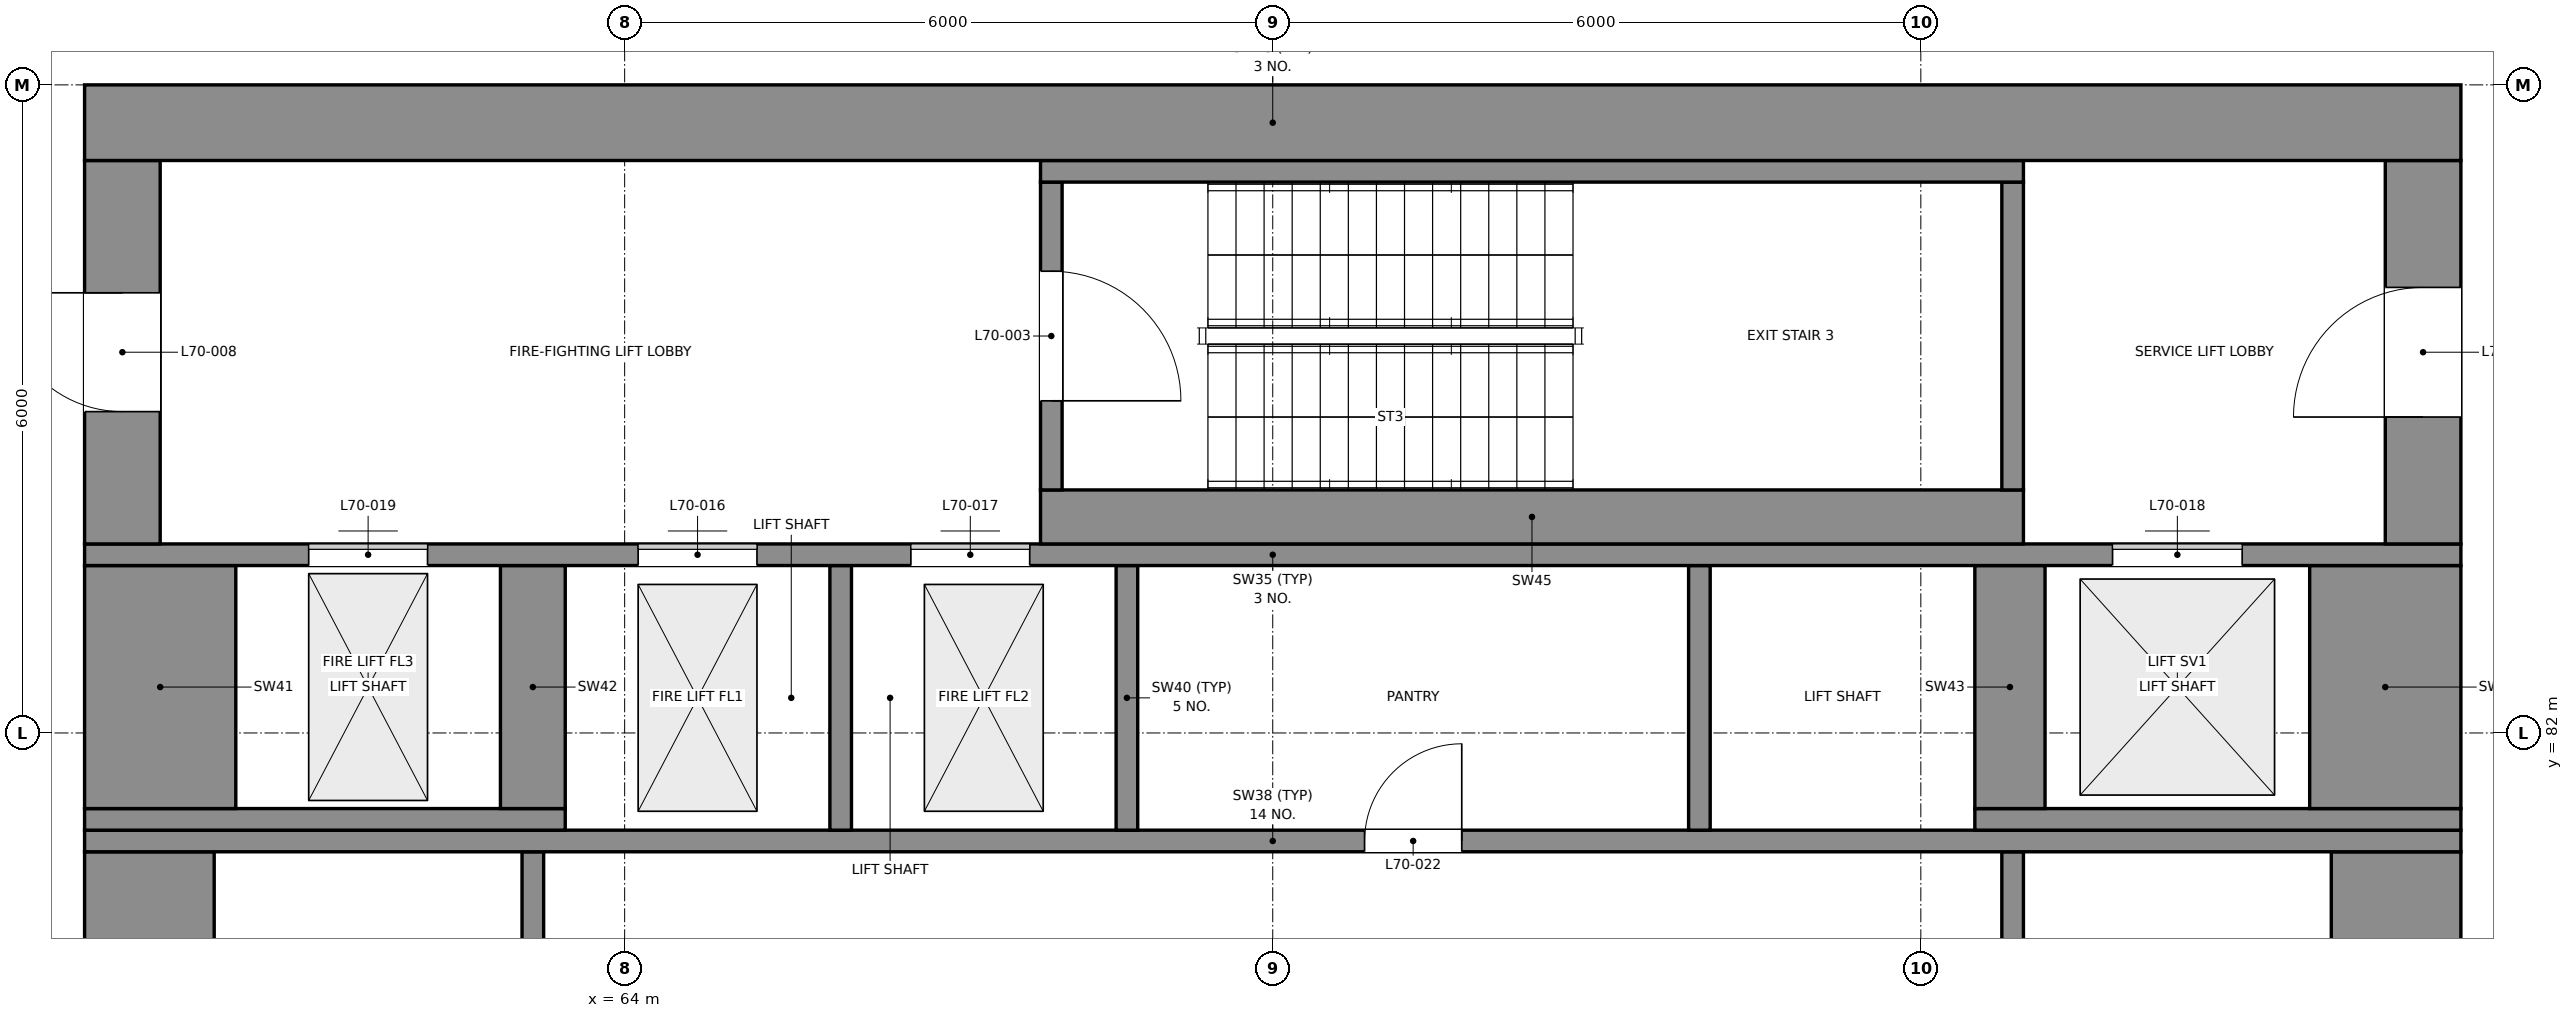
"""IFC4 building model, lengths in metres.
Left out: names, types, materials, properties, quantities, classifications, styles, units other than length and angle.
Written with IfcOpenShell. Run it as: python <this file> out.ifc"""

import sys

from ifc_helpers import new_model, si_unit, direction, frame, frame_2d, origin, place, context, subcontext, project, spatial, rectangle, extrude, element, fill, save


model = new_model("IFC4")
c1 = context("Model", 3, precision=1e-05, world=origin(), true_north=direction((0.0, 1.0)))
c2 = subcontext(c1, "Body", "Model", "MODEL_VIEW")
j1 = project(units=[si_unit("LENGTHUNIT", "METRE"), si_unit("PLANEANGLEUNIT", "RADIAN")], contexts=[c1])
p1 = place(None, origin())
s1 = spatial("IfcSite", under=j1, at=p1, CompositionType="ELEMENT")
p2 = place(p1, origin())
s2 = spatial("IfcBuilding", under=s1, at=p2, CompositionType="ELEMENT")
p3 = place(p2, frame((0.0, 0.0, 295.1)))
s3 = spatial("IfcBuildingStorey", under=s2, at=p3, CompositionType="ELEMENT", Elevation=295.1)
p4 = place(p3, frame((86.872, 83.854, 0.0), z_axis=(0.0, 0.0, 1.0), x_axis=(-0.809017735842, 0.587784231749, 0.0)))
e1 = element("IfcWall", 1, at=p4, inside=s3, PredefinedType="SOLIDWALL", context=c2, shape_type="SweptSolid", body=[
    extrude(rectangle(XDim=6.782, YDim=0.32, at=frame_2d((3.391, 0.0))), origin(), (0.0, 0.0, 1.0), 4.6),
])
for number, where, z_axis, x_axis in (
    (2, (81.385, 87.84, 0.0), (0.0, 0.0, 1.0), (-1.0, 0.0, 0.0)),
    (3, (59.0, 87.84, 0.0), (0.0, 0.0, 1.0), (-1.0, 0.0, 0.0)),
):
    element("IfcWall", number, at=place(p3, frame(where, z_axis=z_axis, x_axis=x_axis)), inside=s3, PredefinedType="SOLIDWALL", context=c2, shape_type="SweptSolid", body=[
        extrude(rectangle(XDim=0.385, YDim=0.32, at=frame_2d((0.192, 0.0))), origin(), (0.0, 0.0, 1.0), 4.6),
    ])
p5 = place(p3, frame((58.615, 87.84, 0.0), z_axis=(0.0, 0.0, 1.0), x_axis=(-0.809017735842, -0.587784231749, 0.0)))
e4 = element("IfcWall", 4, at=p5, inside=s3, PredefinedType="SOLIDWALL", context=c2, shape_type="SweptSolid", body=[
    extrude(rectangle(XDim=6.782, YDim=0.32, at=frame_2d((3.391, 0.0))), origin(), (0.0, 0.0, 1.0), 4.6),
])
for number, where, z_axis, x_axis in (
    (5, (59.6, 71.7, 0.0), (0.0, 0.0, 1.0), (0.0, 1.0, 0.0)),
    (6, (80.4, 71.7, 0.0), (0.0, 0.0, 1.0), (0.0, 1.0, 0.0)),
):
    element("IfcWall", number, at=place(p3, frame(where, z_axis=z_axis, x_axis=x_axis)), inside=s3, PredefinedType="SHEAR", context=c2, shape_type="SweptSolid", body=[
        extrude(rectangle(XDim=9.2, YDim=1.2, at=frame_2d((4.6, 0.0))), origin(), (0.0, 0.0, 1.0), 5.0),
    ])
for number, where, z_axis, x_axis in (
    (7, (63.15, 77.7, 0.0), (0.0, 0.0, 1.0), (0.0, 1.0, 0.0)),
    (8, (76.85, 77.7, 0.0), (0.0, 0.0, 1.0), (0.0, 1.0, 0.0)),
):
    element("IfcWall", number, at=place(p3, frame(where, z_axis=z_axis, x_axis=x_axis)), inside=s3, PredefinedType="SHEAR", context=c2, shape_type="SweptSolid", body=[
        extrude(rectangle(XDim=3.2, YDim=0.2, at=frame_2d((1.6, 0.0))), origin(), (0.0, 0.0, 1.0), 5.0),
    ])
p6 = place(p3, frame((59.0, 81.0, 0.0), z_axis=(0.0, 0.0, 1.0), x_axis=(1.0, 0.0, 0.0)))
e9 = element("IfcWall", 9, at=p6, inside=s3, PredefinedType="SHEAR", context=c2, shape_type="SweptSolid", body=[
    extrude(rectangle(XDim=22.0, YDim=0.2, at=frame_2d((11.0, 0.0))), origin(), (0.0, 0.0, 1.0), 5.0),
])
p7 = place(p6, frame((11.85, 0.0, 0.0)))
e10 = element("IfcOpeningElement", 10, at=p7, cuts=e9, PredefinedType="OPENING", context=c2, shape_type="SweptSolid", body=[
    extrude(rectangle(XDim=0.9, YDim=2.1, at=frame_2d((0.45, 1.05))), frame((0.0, 0.11, 0.0), z_axis=(0.0, -1.0, 0.0), x_axis=(1.0, 0.0, 0.0)), (0.0, 0.0, 1.0), 0.22),
])
p8 = place(p3, frame((59.0, 81.2, 0.0), z_axis=(0.0, 0.0, 1.0), x_axis=(1.0, 0.0, 0.0)))
e11 = element("IfcWall", 11, at=p8, inside=s3, PredefinedType="SHEAR", context=c2, shape_type="SweptSolid", body=[
    extrude(rectangle(XDim=4.45, YDim=0.2, at=frame_2d((2.225, 0.0))), origin(), (0.0, 0.0, 1.0), 5.0),
])
for number, where, z_axis, x_axis in (
    (12, (66.0, 81.1, 0.0), (0.0, 0.0, 1.0), (0.0, 1.0, 0.0)),
    (13, (68.65, 81.1, 0.0), (0.0, 0.0, 1.0), (0.0, 1.0, 0.0)),
    (14, (73.95, 81.1, 0.0), (0.0, 0.0, 1.0), (0.0, 1.0, 0.0)),
):
    element("IfcWall", number, at=place(p3, frame(where, z_axis=z_axis, x_axis=x_axis)), inside=s3, PredefinedType="SHEAR", context=c2, shape_type="SweptSolid", body=[
        extrude(rectangle(XDim=2.45, YDim=0.2, at=frame_2d((1.225, 0.0))), origin(), (0.0, 0.0, 1.0), 5.0),
    ])
p9 = place(p3, frame((76.5, 81.2, 0.0), z_axis=(0.0, 0.0, 1.0), x_axis=(1.0, 0.0, 0.0)))
e15 = element("IfcWall", 15, at=p9, inside=s3, PredefinedType="SHEAR", context=c2, shape_type="SweptSolid", body=[
    extrude(rectangle(XDim=4.5, YDim=0.2, at=frame_2d((2.25, 0.0))), origin(), (0.0, 0.0, 1.0), 5.0),
])
p10 = place(p3, frame((59.7, 81.3, 0.0), z_axis=(0.0, 0.0, 1.0), x_axis=(0.0, 1.0, 0.0)))
e16 = element("IfcWall", 16, at=p10, inside=s3, PredefinedType="SHEAR", context=c2, shape_type="SweptSolid", body=[
    extrude(rectangle(XDim=2.25, YDim=1.4, at=frame_2d((1.125, 0.0))), origin(), (0.0, 0.0, 1.0), 5.0),
])
p11 = place(p3, frame((63.15, 81.3, 0.0), z_axis=(0.0, 0.0, 1.0), x_axis=(0.0, 1.0, 0.0)))
e17 = element("IfcWall", 17, at=p11, inside=s3, PredefinedType="SHEAR", context=c2, shape_type="SweptSolid", body=[
    extrude(rectangle(XDim=2.25, YDim=0.6, at=frame_2d((1.125, 0.0))), origin(), (0.0, 0.0, 1.0), 5.0),
])
p12 = place(p3, frame((76.825, 81.3, 0.0), z_axis=(0.0, 0.0, 1.0), x_axis=(0.0, 1.0, 0.0)))
e18 = element("IfcWall", 18, at=p12, inside=s3, PredefinedType="SHEAR", context=c2, shape_type="SweptSolid", body=[
    extrude(rectangle(XDim=2.25, YDim=0.65, at=frame_2d((1.125, 0.0))), origin(), (0.0, 0.0, 1.0), 5.0),
])
p13 = place(p3, frame((80.3, 81.3, 0.0), z_axis=(0.0, 0.0, 1.0), x_axis=(0.0, 1.0, 0.0)))
e19 = element("IfcWall", 19, at=p13, inside=s3, PredefinedType="SHEAR", context=c2, shape_type="SweptSolid", body=[
    extrude(rectangle(XDim=2.25, YDim=1.4, at=frame_2d((1.125, 0.0))), origin(), (0.0, 0.0, 1.0), 5.0),
])
p14 = place(p3, frame((59.0, 83.65, 0.0), z_axis=(0.0, 0.0, 1.0), x_axis=(1.0, 0.0, 0.0)))
e20 = element("IfcWall", 20, at=p14, inside=s3, PredefinedType="SHEAR", context=c2, shape_type="SweptSolid", body=[
    extrude(rectangle(XDim=22.0, YDim=0.2, at=frame_2d((11.0, 0.0))), origin(), (0.0, 0.0, 1.0), 5.0),
])
p15 = place(p14, frame((5.125, 0.0, 0.0)))
e21 = element("IfcOpeningElement", 21, at=p15, cuts=e20, PredefinedType="OPENING", context=c2, shape_type="SweptSolid", body=[
    extrude(rectangle(XDim=1.1, YDim=2.1, at=frame_2d((0.55, 1.05))), frame((0.0, 0.11, 0.0), z_axis=(0.0, -1.0, 0.0), x_axis=(1.0, 0.0, 0.0)), (0.0, 0.0, 1.0), 0.22),
])
p16 = place(p14, frame((7.65, 0.0, 0.0)))
e22 = element("IfcOpeningElement", 22, at=p16, cuts=e20, PredefinedType="OPENING", context=c2, shape_type="SweptSolid", body=[
    extrude(rectangle(XDim=1.1, YDim=2.1, at=frame_2d((0.55, 1.05))), frame((0.0, 0.11, 0.0), z_axis=(0.0, -1.0, 0.0), x_axis=(1.0, 0.0, 0.0)), (0.0, 0.0, 1.0), 0.22),
])
p17 = place(p14, frame((18.775, 0.0, 0.0)))
e23 = element("IfcOpeningElement", 23, at=p17, cuts=e20, PredefinedType="OPENING", context=c2, shape_type="SweptSolid", body=[
    extrude(rectangle(XDim=1.2, YDim=2.1, at=frame_2d((0.6, 1.05))), frame((0.0, 0.11, 0.0), z_axis=(0.0, -1.0, 0.0), x_axis=(1.0, 0.0, 0.0)), (0.0, 0.0, 1.0), 0.22),
])
p18 = place(p14, frame((2.075, 0.0, 0.0)))
e24 = element("IfcOpeningElement", 24, at=p18, cuts=e20, PredefinedType="OPENING", context=c2, shape_type="SweptSolid", body=[
    extrude(rectangle(XDim=1.1, YDim=2.1, at=frame_2d((0.55, 1.05))), frame((0.0, 0.11, 0.0), z_axis=(0.0, -1.0, 0.0), x_axis=(1.0, 0.0, 0.0)), (0.0, 0.0, 1.0), 0.22),
])
p19 = place(p3, frame((59.35, 83.75, 0.0), z_axis=(0.0, 0.0, 1.0), x_axis=(0.0, 1.0, 0.0)))
e25 = element("IfcWall", 25, at=p19, inside=s3, PredefinedType="SHEAR", context=c2, shape_type="SweptSolid", body=[
    extrude(rectangle(XDim=3.55, YDim=0.7, at=frame_2d((1.775, 0.0))), origin(), (0.0, 0.0, 1.0), 5.0),
])
p20 = place(p19, frame((1.225, 0.0, 0.0)))
e26 = element("IfcOpeningElement", 26, at=p20, cuts=e25, PredefinedType="OPENING", context=c2, shape_type="SweptSolid", body=[
    extrude(rectangle(XDim=1.1, YDim=2.1, at=frame_2d((0.55, 1.05))), frame((0.0, 0.36, 0.0), z_axis=(0.0, -1.0, 0.0), x_axis=(1.0, 0.0, 0.0)), (0.0, 0.0, 1.0), 0.72),
])
p21 = place(p3, frame((67.85, 84.0, 0.0), z_axis=(0.0, 0.0, 1.0), x_axis=(1.0, 0.0, 0.0)))
e27 = element("IfcWall", 27, at=p21, inside=s3, PredefinedType="SHEAR", context=c2, shape_type="SweptSolid", body=[
    extrude(rectangle(XDim=9.1, YDim=0.5, at=frame_2d((4.55, 0.0))), origin(), (0.0, 0.0, 1.0), 5.0),
])
p22 = place(p3, frame((80.65, 83.75, 0.0), z_axis=(0.0, 0.0, 1.0), x_axis=(0.0, 1.0, 0.0)))
e28 = element("IfcWall", 28, at=p22, inside=s3, PredefinedType="SHEAR", context=c2, shape_type="SweptSolid", body=[
    extrude(rectangle(XDim=3.55, YDim=0.7, at=frame_2d((1.775, 0.0))), origin(), (0.0, 0.0, 1.0), 5.0),
])
p23 = place(p22, frame((1.175, 0.0, 0.0)))
e29 = element("IfcOpeningElement", 29, at=p23, cuts=e28, PredefinedType="OPENING", context=c2, shape_type="SweptSolid", body=[
    extrude(rectangle(XDim=1.2, YDim=2.1, at=frame_2d((0.6, 1.05))), frame((0.0, 0.36, 0.0), z_axis=(0.0, -1.0, 0.0), x_axis=(1.0, 0.0, 0.0)), (0.0, 0.0, 1.0), 0.72),
])
p24 = place(p3, frame((67.95, 84.25, 0.0), z_axis=(0.0, 0.0, 1.0), x_axis=(0.0, 1.0, 0.0)))
e30 = element("IfcWall", 30, at=p24, inside=s3, PredefinedType="SHEAR", context=c2, shape_type="SweptSolid", body=[
    extrude(rectangle(XDim=2.85, YDim=0.2, at=frame_2d((1.425, 0.0))), origin(), (0.0, 0.0, 1.0), 5.0),
])
p25 = place(p24, frame((0.825, 0.0, 0.0)))
e31 = element("IfcOpeningElement", 31, at=p25, cuts=e30, PredefinedType="OPENING", context=c2, shape_type="SweptSolid", body=[
    extrude(rectangle(XDim=1.2, YDim=2.1, at=frame_2d((0.6, 1.05))), frame((0.0, 0.11, 0.0), z_axis=(0.0, -1.0, 0.0), x_axis=(1.0, 0.0, 0.0)), (0.0, 0.0, 1.0), 0.22),
])
p26 = place(p3, frame((76.85, 84.25, 0.0), z_axis=(0.0, 0.0, 1.0), x_axis=(0.0, 1.0, 0.0)))
e32 = element("IfcWall", 32, at=p26, inside=s3, PredefinedType="SHEAR", context=c2, shape_type="SweptSolid", body=[
    extrude(rectangle(XDim=2.85, YDim=0.2, at=frame_2d((1.425, 0.0))), origin(), (0.0, 0.0, 1.0), 5.0),
])
p27 = place(p3, frame((67.85, 87.2, 0.0), z_axis=(0.0, 0.0, 1.0), x_axis=(1.0, 0.0, 0.0)))
e33 = element("IfcWall", 33, at=p27, inside=s3, PredefinedType="SHEAR", context=c2, shape_type="SweptSolid", body=[
    extrude(rectangle(XDim=9.1, YDim=0.2, at=frame_2d((4.55, 0.0))), origin(), (0.0, 0.0, 1.0), 5.0),
])
p28 = place(p3, frame((59.0, 87.65, 0.0), z_axis=(0.0, 0.0, 1.0), x_axis=(1.0, 0.0, 0.0)))
e34 = element("IfcWall", 34, at=p28, inside=s3, PredefinedType="SHEAR", context=c2, shape_type="SweptSolid", body=[
    extrude(rectangle(XDim=22.0, YDim=0.7, at=frame_2d((11.0, 0.0))), origin(), (0.0, 0.0, 1.0), 5.0),
])
p29 = place(p25, frame((1.2, 0.0, 0.0), z_axis=(0.0, 0.0, 1.0), x_axis=(-1.0, 0.0, 0.0)))
e35 = element("IfcDoor", 35, at=p29, inside=s3, OperationType="SINGLE_SWING_RIGHT", PredefinedType="DOOR", context=c2, shape_type="SweptSolid", body=[
    extrude(rectangle(XDim=1.2, YDim=2.1, at=frame_2d((0.6, 1.05))), frame((0.0, 0.025, 0.0), z_axis=(0.0, -1.0, 0.0), x_axis=(1.0, 0.0, 0.0)), (0.0, 0.0, 1.0), 0.05),
])
fill(e31, e35)
p30 = place(p20, origin())
e36 = element("IfcDoor", 36, at=p30, inside=s3, OperationType="SINGLE_SWING_RIGHT", PredefinedType="DOOR", context=c2, shape_type="SweptSolid", body=[
    extrude(rectangle(XDim=1.1, YDim=2.1, at=frame_2d((0.55, 1.05))), frame((0.0, 0.025, 0.0), z_axis=(0.0, -1.0, 0.0), x_axis=(1.0, 0.0, 0.0)), (0.0, 0.0, 1.0), 0.05),
])
fill(e26, e36)
p31 = place(p23, origin())
e37 = element("IfcDoor", 37, at=p31, inside=s3, OperationType="SINGLE_SWING_LEFT", PredefinedType="DOOR", context=c2, shape_type="SweptSolid", body=[
    extrude(rectangle(XDim=1.2, YDim=2.1, at=frame_2d((0.6, 1.05))), frame((0.0, 0.025, 0.0), z_axis=(0.0, -1.0, 0.0), x_axis=(1.0, 0.0, 0.0)), (0.0, 0.0, 1.0), 0.05),
])
fill(e29, e37)
p32 = place(p15, origin())
e38 = element("IfcDoor", 38, at=p32, inside=s3, OperationType="DOUBLE_DOOR_SLIDING", PredefinedType="DOOR", context=c2, shape_type="SweptSolid", body=[
    extrude(rectangle(XDim=1.1, YDim=2.1, at=frame_2d((0.55, 1.05))), frame((0.0, 0.025, 0.0), z_axis=(0.0, -1.0, 0.0), x_axis=(1.0, 0.0, 0.0)), (0.0, 0.0, 1.0), 0.05),
])
fill(e21, e38)
p33 = place(p16, origin())
e39 = element("IfcDoor", 39, at=p33, inside=s3, OperationType="DOUBLE_DOOR_SLIDING", PredefinedType="DOOR", context=c2, shape_type="SweptSolid", body=[
    extrude(rectangle(XDim=1.1, YDim=2.1, at=frame_2d((0.55, 1.05))), frame((0.0, 0.025, 0.0), z_axis=(0.0, -1.0, 0.0), x_axis=(1.0, 0.0, 0.0)), (0.0, 0.0, 1.0), 0.05),
])
fill(e22, e39)
p34 = place(p17, origin())
e40 = element("IfcDoor", 40, at=p34, inside=s3, OperationType="DOUBLE_DOOR_SLIDING", PredefinedType="DOOR", context=c2, shape_type="SweptSolid", body=[
    extrude(rectangle(XDim=1.2, YDim=2.1, at=frame_2d((0.6, 1.05))), frame((0.0, 0.025, 0.0), z_axis=(0.0, -1.0, 0.0), x_axis=(1.0, 0.0, 0.0)), (0.0, 0.0, 1.0), 0.05),
])
fill(e23, e40)
p35 = place(p18, origin())
e41 = element("IfcDoor", 41, at=p35, inside=s3, OperationType="DOUBLE_DOOR_SLIDING", PredefinedType="DOOR", context=c2, shape_type="SweptSolid", body=[
    extrude(rectangle(XDim=1.1, YDim=2.1, at=frame_2d((0.55, 1.05))), frame((0.0, 0.025, 0.0), z_axis=(0.0, -1.0, 0.0), x_axis=(1.0, 0.0, 0.0)), (0.0, 0.0, 1.0), 0.05),
])
fill(e24, e41)
p36 = place(p7, origin())
e42 = element("IfcDoor", 42, at=p36, inside=s3, OperationType="SINGLE_SWING_RIGHT", PredefinedType="DOOR", context=c2, shape_type="SweptSolid", body=[
    extrude(rectangle(XDim=0.9, YDim=2.1, at=frame_2d((0.45, 1.05))), frame((0.0, 0.025, 0.0), z_axis=(0.0, -1.0, 0.0), x_axis=(1.0, 0.0, 0.0)), (0.0, 0.0, 1.0), 0.05),
])
fill(e10, e42)
save(model, sys.argv[1])
